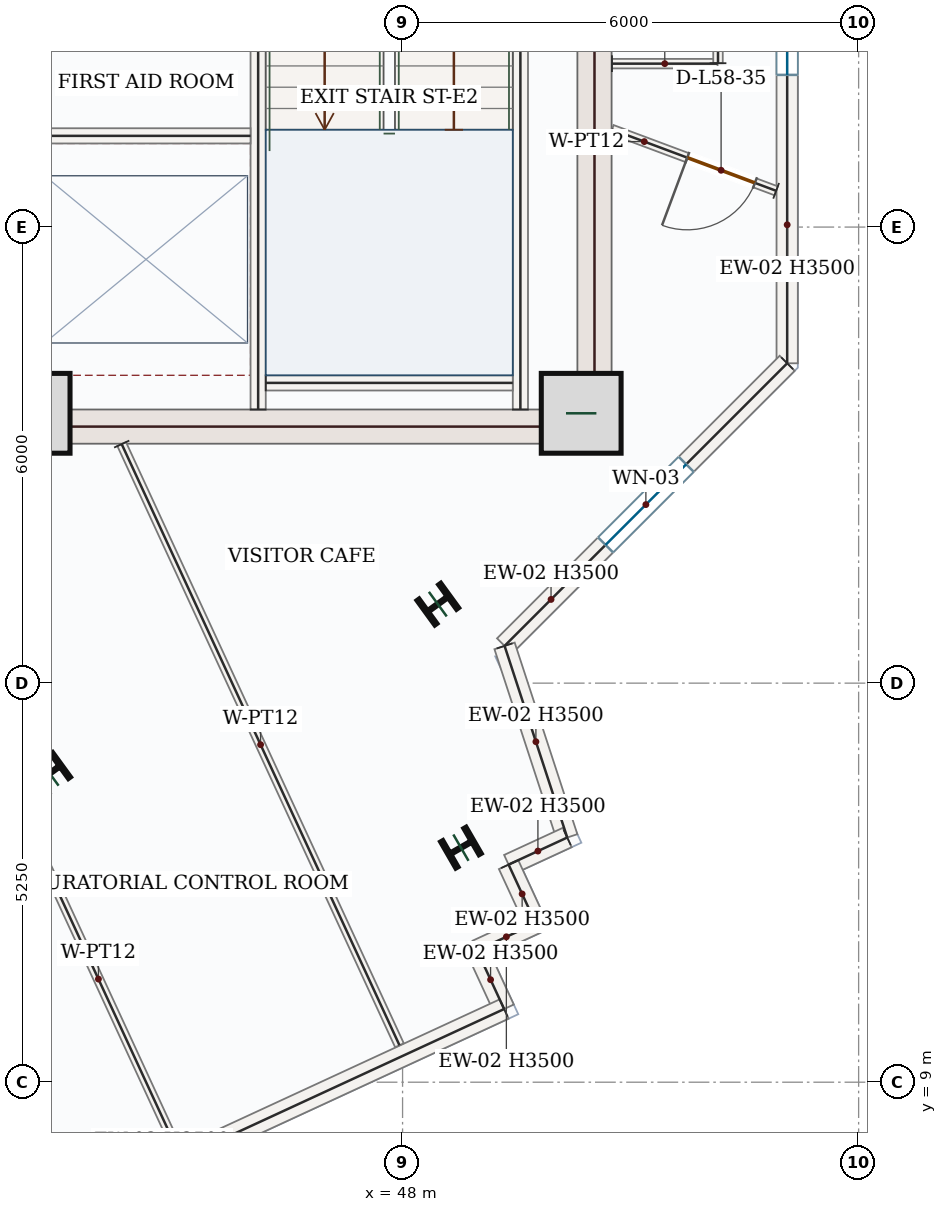
"""IFC4 building model, lengths in metres.
Left out: names, types, materials, properties, quantities, classifications, styles, units other than length and angle.
Written with IfcOpenShell. Run it as: python <this file> out.ifc"""

import sys

from ifc_helpers import new_model, si_unit, direction, frame, frame_2d, origin, origin_2d, place, context, subcontext, project, spatial, rectangle, i_section, extrude, source, transform, mapped, element, fill, save


model = new_model("IFC4")
c1 = context("Model", 3, precision=1e-05, world=origin(), true_north=direction((0.0, 1.0)))
c2 = subcontext(c1, "Body", "Model", "MODEL_VIEW")
j1 = project(units=[si_unit("LENGTHUNIT", "METRE"), si_unit("PLANEANGLEUNIT", "RADIAN")], contexts=[c1])
p1 = place(None, origin())
s1 = spatial("IfcSite", under=j1, at=p1, CompositionType="ELEMENT")
p2 = place(p1, origin())
s2 = spatial("IfcBuilding", under=s1, at=p2, CompositionType="ELEMENT")
p3 = place(p2, frame((0.0, 0.0, 246.6)))
s3 = spatial("IfcBuildingStorey", under=s2, at=p3, CompositionType="ELEMENT", Elevation=246.6)
m1 = source(origin(), c2, "Body", "SweptSolid", [
    extrude(rectangle(XDim=8.55, YDim=0.45, at=frame_2d((4.275, 0.0))), origin(), (0.0, 0.0, 1.0), 3.5),
])
p4 = place(p3, frame((50.525, 17.4, 0.0), z_axis=(0.0, 0.0, 1.0), x_axis=(0.0, 1.0, 0.0)))
e1 = element("IfcWall", 1, at=p4, inside=s3, PredefinedType="SHEAR", context=c2, shape_type="MappedRepresentation", body=[
    mapped(m1, transform((0.0, 0.0, 0.0), x_axis=(1.0, 0.0, 0.0), y_axis=(0.0, 1.0, 0.0), z_axis=(0.0, 0.0, 1.0), scale=1.0)),
])
m2 = source(origin(), c2, "Body", "SweptSolid", [
    extrude(rectangle(XDim=7.1, YDim=0.45, at=frame_2d((3.55, 0.0))), origin(), (0.0, 0.0, 1.0), 3.5),
])
p5 = place(p3, frame((43.2, 17.625, 0.0), z_axis=(0.0, 0.0, 1.0), x_axis=(1.0, 0.0, 0.0)))
e2 = element("IfcWall", 2, at=p5, inside=s3, PredefinedType="SHEAR", context=c2, shape_type="MappedRepresentation", body=[
    mapped(m2, transform((0.0, 0.0, 0.0), x_axis=(1.0, 0.0, 0.0), y_axis=(0.0, 1.0, 0.0), z_axis=(0.0, 0.0, 1.0), scale=1.0)),
])
m3 = source(origin(), c2, "Body", "SweptSolid", [
    extrude(rectangle(XDim=1.05, YDim=1.05, at=origin_2d()), origin(), (0.0, 0.0, 1.0), 3.75),
])
for number, where, z_axis, x_axis in (
    (3, (43.1, 17.8, 0.0), (0.0, 0.0, 1.0), (1.0, 0.0, 0.0)),
    (4, (50.35, 17.8, 0.0), (0.0, 0.0, 1.0), (1.0, 0.0, 0.0)),
):
    element("IfcColumn", number, at=place(p3, frame(where, z_axis=z_axis, x_axis=x_axis)), inside=s3, PredefinedType="COLUMN", context=c2, shape_type="MappedRepresentation", body=[
        mapped(m3, transform((0.0, 0.0, 0.0), x_axis=(1.0, 0.0, 0.0), y_axis=(0.0, 1.0, 0.0), z_axis=(0.0, 0.0, 1.0), scale=1.0)),
    ])
m4 = source(origin(), c2, "Body", "SweptSolid", [
    extrude(i_section(OverallWidth=0.399, OverallDepth=0.386, WebThickness=0.021, FlangeThickness=0.033, FilletRadius=0.018, at=origin_2d()), origin(), (0.0, 0.0, 1.0), 3.75),
])
for number, where, z_axis, x_axis in (
    (5, (43.357, 13.063, 0.0), (0.0, 0.0, 1.0), (-0.588, 0.809, 0.0)),
    (6, (48.464, 15.289, 0.0), (0.0, 0.0, 1.0), (-0.588, 0.809, 0.0)),
    (7, (48.768, 12.086, 0.0), (0.0, 0.0, 1.0), (-0.5, 0.866, 0.0)),
):
    element("IfcColumn", number, at=place(p3, frame(where, z_axis=z_axis, x_axis=x_axis)), inside=s3, PredefinedType="COLUMN", context=c2, shape_type="MappedRepresentation", body=[
        mapped(m4, transform((0.0, 0.0, 0.0), x_axis=(1.0, 0.0, 0.0), y_axis=(0.0, 1.0, 0.0), z_axis=(0.0, 0.0, 1.0), scale=1.0)),
    ])
p6 = place(p3, frame((53.06, 27.546, 0.0), z_axis=(0.0, 0.0, 1.0), x_axis=(0.0, -1.0, 0.0)))
e8 = element("IfcWall", 8, at=p6, inside=s3, PredefinedType="SOLIDWALL", context=c2, shape_type="SweptSolid", body=[
    extrude(rectangle(XDim=9.088, YDim=0.28, at=frame_2d((4.544, 0.0))), origin(), (0.0, 0.0, 1.0), 3.5),
])
p7 = place(p6, frame((3.794, 0.0, 0.85)))
e9 = element("IfcOpeningElement", 9, at=p7, cuts=e8, PredefinedType="OPENING", context=c2, shape_type="SweptSolid", body=[
    extrude(rectangle(XDim=1.5, YDim=1.5, at=frame_2d((0.75, 0.75))), frame((0.0, 0.15, 0.0), z_axis=(0.0, -1.0, 0.0), x_axis=(1.0, 0.0, 0.0)), (0.0, 0.0, 1.0), 0.3),
])
p8 = place(p3, frame((53.06, 18.458, 0.0), z_axis=(0.0, 0.0, 1.0), x_axis=(-0.707106781187, -0.707106781187, 0.0)))
e10 = element("IfcWall", 10, at=p8, inside=s3, PredefinedType="SOLIDWALL", context=c2, shape_type="SweptSolid", body=[
    extrude(rectangle(XDim=5.258, YDim=0.28, at=frame_2d((2.629, 0.0))), origin(), (0.0, 0.0, 1.0), 3.5),
])
p9 = place(p8, frame((1.879, 0.0, 0.85)))
e11 = element("IfcOpeningElement", 11, at=p9, cuts=e10, PredefinedType="OPENING", context=c2, shape_type="SweptSolid", body=[
    extrude(rectangle(XDim=1.5, YDim=1.5, at=frame_2d((0.75, 0.75))), frame((0.0, 0.15, 0.0), z_axis=(0.0, -1.0, 0.0), x_axis=(1.0, 0.0, 0.0)), (0.0, 0.0, 1.0), 0.3),
])
m5 = source(origin(), c2, "Body", "SweptSolid", [
    extrude(rectangle(XDim=2.652, YDim=0.28, at=frame_2d((1.326, 0.0))), origin(), (0.0, 0.0, 1.0), 3.5),
])
p10 = place(p3, frame((49.342, 14.74, 0.0), z_axis=(0.0, 0.0, 1.0), x_axis=(0.310838004308, -0.950462905682, 0.0)))
e12 = element("IfcWall", 12, at=p10, inside=s3, PredefinedType="SOLIDWALL", context=c2, shape_type="MappedRepresentation", body=[
    mapped(m5, transform((0.0, 0.0, 0.0), x_axis=(1.0, 0.0, 0.0), y_axis=(0.0, 1.0, 0.0), z_axis=(0.0, 0.0, 1.0), scale=1.0)),
])
m6 = source(origin(), c2, "Body", "SweptSolid", [
    extrude(rectangle(XDim=0.85, YDim=0.28, at=frame_2d((0.425, 0.0))), origin(), (0.0, 0.0, 1.0), 3.5),
])
for number, where, z_axis, x_axis in (
    (13, (50.167, 12.219, 0.0), (0.0, 0.0, 1.0), (-0.908, -0.419, 0.0)),
    (14, (49.395, 11.863, 0.0), (0.0, 0.0, 1.0), (0.419, -0.908, 0.0)),
):
    element("IfcWall", number, at=place(p3, frame(where, z_axis=z_axis, x_axis=x_axis)), inside=s3, PredefinedType="SOLIDWALL", context=c2, shape_type="MappedRepresentation", body=[
        mapped(m6, transform((0.0, 0.0, 0.0), x_axis=(1.0, 0.0, 0.0), y_axis=(0.0, 1.0, 0.0), z_axis=(0.0, 0.0, 1.0), scale=1.0)),
    ])
m7 = source(origin(), c2, "Body", "SweptSolid", [
    extrude(rectangle(XDim=0.85, YDim=0.28, at=frame_2d((0.425, 0.0))), origin(), (0.0, 0.0, 1.0), 3.5),
])
p11 = place(p3, frame((49.751, 11.091, 0.0), z_axis=(0.0, 0.0, 1.0), x_axis=(-0.907791150023, -0.419422493365, 0.0)))
e15 = element("IfcWall", 15, at=p11, inside=s3, PredefinedType="SOLIDWALL", context=c2, shape_type="MappedRepresentation", body=[
    mapped(m7, transform((0.0, 0.0, 0.0), x_axis=(1.0, 0.0, 0.0), y_axis=(0.0, 1.0, 0.0), z_axis=(0.0, 0.0, 1.0), scale=1.0)),
])
p12 = place(p3, frame((48.98, 10.734, 0.0), z_axis=(0.0, 0.0, 1.0), x_axis=(0.419313139191, -0.907841666427, 0.0)))
e16 = element("IfcWall", 16, at=p12, inside=s3, PredefinedType="SOLIDWALL", context=c2, shape_type="MappedRepresentation", body=[
    mapped(m6, transform((0.0, 0.0, 0.0), x_axis=(1.0, 0.0, 0.0), y_axis=(0.0, 1.0, 0.0), z_axis=(0.0, 0.0, 1.0), scale=1.0)),
])
m8 = source(origin(), c2, "Body", "SweptSolid", [
    extrude(rectangle(XDim=9.92, YDim=0.28, at=frame_2d((4.96, 0.0))), origin(), (0.0, 0.0, 1.0), 3.5),
])
p13 = place(p3, frame((49.336, 9.963, 0.0), z_axis=(0.0, 0.0, 1.0), x_axis=(-0.907779940536, -0.419446754143, 0.0)))
e17 = element("IfcWall", 17, at=p13, inside=s3, PredefinedType="SOLIDWALL", context=c2, shape_type="MappedRepresentation", body=[
    mapped(m8, transform((0.0, 0.0, 0.0), x_axis=(1.0, 0.0, 0.0), y_axis=(0.0, 1.0, 0.0), z_axis=(0.0, 0.0, 1.0), scale=1.0)),
])
m9 = source(origin(), c2, "Body", "SweptSolid", [
    extrude(rectangle(XDim=7.87, YDim=0.2, at=frame_2d((3.935, 0.0))), origin(), (0.0, 0.0, 1.0), 3.5),
])
p14 = place(p3, frame((49.55, 17.85, 0.0), z_axis=(0.0, 0.0, 1.0), x_axis=(0.0, 1.0, 0.0)))
e18 = element("IfcWall", 18, at=p14, inside=s3, PredefinedType="SOLIDWALL", context=c2, shape_type="MappedRepresentation", body=[
    mapped(m9, transform((0.0, 0.0, 0.0), x_axis=(1.0, 0.0, 0.0), y_axis=(0.0, 1.0, 0.0), z_axis=(0.0, 0.0, 1.0), scale=1.0)),
])
p15 = place(p3, frame((46.1, 17.85, 0.0), z_axis=(0.0, 0.0, 1.0), x_axis=(0.0, 1.0, 0.0)))
e19 = element("IfcWall", 19, at=p15, inside=s3, PredefinedType="SOLIDWALL", context=c2, shape_type="SweptSolid", body=[
    extrude(rectangle(XDim=8.0, YDim=0.2, at=frame_2d((4.0, 0.0))), origin(), (0.0, 0.0, 1.0), 3.5),
])
p16 = place(p15, frame((6.3, 0.0, 0.0)))
e20 = element("IfcOpeningElement", 20, at=p16, cuts=e19, PredefinedType="OPENING", context=c2, shape_type="SweptSolid", body=[
    extrude(rectangle(XDim=1.05, YDim=2.15, at=frame_2d((0.525, 1.075))), frame((0.0, 0.11, 0.0), z_axis=(0.0, -1.0, 0.0), x_axis=(1.0, 0.0, 0.0)), (0.0, 0.0, 1.0), 0.22),
])
m10 = source(origin(), c2, "Body", "SweptSolid", [
    extrude(rectangle(XDim=3.25, YDim=0.2, at=frame_2d((1.625, 0.0))), origin(), (0.0, 0.0, 1.0), 3.5),
])
p17 = place(p3, frame((46.2, 18.2, 0.0), z_axis=(0.0, 0.0, 1.0), x_axis=(1.0, 0.0, 0.0)))
e21 = element("IfcWall", 21, at=p17, inside=s3, PredefinedType="SOLIDWALL", context=c2, shape_type="MappedRepresentation", body=[
    mapped(m10, transform((0.0, 0.0, 0.0), x_axis=(1.0, 0.0, 0.0), y_axis=(0.0, 1.0, 0.0), z_axis=(0.0, 0.0, 1.0), scale=1.0)),
])
m11 = source(origin(), c2, "Body", "SweptSolid", [
    extrude(rectangle(XDim=2.75, YDim=0.2, at=frame_2d((1.375, 0.0))), origin(), (0.0, 0.0, 1.0), 3.5),
])
p18 = place(p3, frame((43.25, 21.45, 0.0), z_axis=(0.0, 0.0, 1.0), x_axis=(1.0, 0.0, 0.0)))
e22 = element("IfcWall", 22, at=p18, inside=s3, PredefinedType="SOLIDWALL", context=c2, shape_type="MappedRepresentation", body=[
    mapped(m11, transform((0.0, 0.0, 0.0), x_axis=(1.0, 0.0, 0.0), y_axis=(0.0, 1.0, 0.0), z_axis=(0.0, 0.0, 1.0), scale=1.0)),
])
m12 = source(origin(), c2, "Body", "SweptSolid", [
    extrude(rectangle(XDim=4.904, YDim=0.125, at=frame_2d((2.452, 0.0))), origin(), (0.0, 0.0, 1.0), 3.5),
])
p19 = place(p3, frame((45.027, 8.131, 0.0), z_axis=(0.0, 0.0, 1.0), x_axis=(-0.419459107568, 0.907774232438, 0.0)))
e23 = element("IfcWall", 23, at=p19, inside=s3, PredefinedType="PARTITIONING", context=c2, shape_type="MappedRepresentation", body=[
    mapped(m12, transform((0.0, 0.0, 0.0), x_axis=(1.0, 0.0, 0.0), y_axis=(0.0, 1.0, 0.0), z_axis=(0.0, 0.0, 1.0), scale=1.0)),
])
m13 = source(origin(), c2, "Body", "SweptSolid", [
    extrude(rectangle(XDim=8.712, YDim=0.125, at=frame_2d((4.356, 0.0))), origin(), (0.0, 0.0, 1.0), 3.5),
])
p20 = place(p3, frame((44.305, 17.395, 0.0), z_axis=(0.0, 0.0, 1.0), x_axis=(0.419438424399, -0.907783789312, 0.0)))
e24 = element("IfcWall", 24, at=p20, inside=s3, PredefinedType="PARTITIONING", context=c2, shape_type="MappedRepresentation", body=[
    mapped(m13, transform((0.0, 0.0, 0.0), x_axis=(1.0, 0.0, 0.0), y_axis=(0.0, 1.0, 0.0), z_axis=(0.0, 0.0, 1.0), scale=1.0)),
])
m14 = source(origin(), c2, "Body", "SweptSolid", [
    extrude(rectangle(XDim=1.389, YDim=0.125, at=frame_2d((0.695, 0.0))), origin(), (0.0, 0.0, 1.0), 3.5),
])
p21 = place(p3, frame((50.755, 22.4, 0.0), z_axis=(0.0, 0.0, 1.0), x_axis=(1.0, 0.0, 0.0)))
e25 = element("IfcWall", 25, at=p21, inside=s3, PredefinedType="PARTITIONING", context=c2, shape_type="MappedRepresentation", body=[
    mapped(m14, transform((0.0, 0.0, 0.0), x_axis=(1.0, 0.0, 0.0), y_axis=(0.0, 1.0, 0.0), z_axis=(0.0, 0.0, 1.0), scale=1.0)),
])
p22 = place(p3, frame((52.15, 22.406, 0.0), z_axis=(0.0, 0.0, 1.0), x_axis=(-2.657666e-05, 0.999999999647, 0.0)))
e26 = element("IfcWall", 26, at=p22, inside=s3, PredefinedType="PARTITIONING", context=c2, shape_type="SweptSolid", body=[
    extrude(rectangle(XDim=9.186, YDim=0.125, at=frame_2d((4.593, 0.0))), origin(), (0.0, 0.0, 1.0), 3.5),
])
p23 = place(p22, frame((5.354, 0.0, 0.0)))
e27 = element("IfcOpeningElement", 27, at=p23, cuts=e26, PredefinedType="OPENING", context=c2, shape_type="SweptSolid", body=[
    extrude(rectangle(XDim=0.95, YDim=2.15, at=frame_2d((0.475, 1.075))), frame((0.0, 0.073, 0.0), z_axis=(0.0, -1.0, 0.0), x_axis=(1.0, 0.0, 0.0)), (0.0, 0.0, 1.0), 0.145),
])
p24 = place(p3, frame((52.915, 20.727, 0.0), z_axis=(0.0, 0.0, 1.0), x_axis=(-0.936884992217, 0.349637685839, 0.0)))
e28 = element("IfcWall", 28, at=p24, inside=s3, PredefinedType="PARTITIONING", context=c2, shape_type="SweptSolid", body=[
    extrude(rectangle(XDim=2.306, YDim=0.125, at=frame_2d((1.153, 0.0))), origin(), (0.0, 0.0, 1.0), 3.5),
])
p25 = place(p24, frame((0.298, 0.0, 0.0)))
e29 = element("IfcOpeningElement", 29, at=p25, cuts=e28, PredefinedType="OPENING", context=c2, shape_type="SweptSolid", body=[
    extrude(rectangle(XDim=0.95, YDim=2.15, at=frame_2d((0.475, 1.075))), frame((0.0, 0.073, 0.0), z_axis=(0.0, -1.0, 0.0), x_axis=(1.0, 0.0, 0.0)), (0.0, 0.0, 1.0), 0.145),
])
m15 = source(origin(), c2, "Body", "SweptSolid", [
    extrude(rectangle(XDim=1.5, YDim=1.5, at=frame_2d((0.75, 0.75))), frame((0.0, 0.03, 0.0), z_axis=(0.0, -1.0, 0.0), x_axis=(1.0, 0.0, 0.0)), (0.0, 0.0, 1.0), 0.06),
])
p26 = place(p7, origin())
e30 = element("IfcWindow", 30, at=p26, inside=s3, PartitioningType="SINGLE_PANEL", PredefinedType="WINDOW", context=c2, shape_type="MappedRepresentation", body=[
    mapped(m15, transform((0.0, 0.0, 0.0), x_axis=(1.0, 0.0, 0.0), y_axis=(0.0, 1.0, 0.0), z_axis=(0.0, 0.0, 1.0), scale=1.0)),
])
fill(e9, e30)
p27 = place(p9, origin())
e31 = element("IfcWindow", 31, at=p27, inside=s3, PartitioningType="SINGLE_PANEL", PredefinedType="WINDOW", context=c2, shape_type="MappedRepresentation", body=[
    mapped(m15, transform((0.0, 0.0, 0.0), x_axis=(1.0, 0.0, 0.0), y_axis=(0.0, 1.0, 0.0), z_axis=(0.0, 0.0, 1.0), scale=1.0)),
])
fill(e11, e31)
m16 = source(origin(), c2, "Body", "SweptSolid", [
    extrude(rectangle(XDim=0.95, YDim=2.15, at=frame_2d((0.475, 1.075))), frame((0.0, 0.025, 0.0), z_axis=(0.0, -1.0, 0.0), x_axis=(1.0, 0.0, 0.0)), (0.0, 0.0, 1.0), 0.05),
])
p28 = place(p25, origin())
e32 = element("IfcDoor", 32, at=p28, inside=s3, OperationType="SINGLE_SWING_RIGHT", PredefinedType="DOOR", context=c2, shape_type="MappedRepresentation", body=[
    mapped(m16, transform((0.0, 0.0, 0.0), x_axis=(1.0, 0.0, 0.0), y_axis=(0.0, 1.0, 0.0), z_axis=(0.0, 0.0, 1.0), scale=1.0)),
])
fill(e29, e32)
save(model, sys.argv[1])
